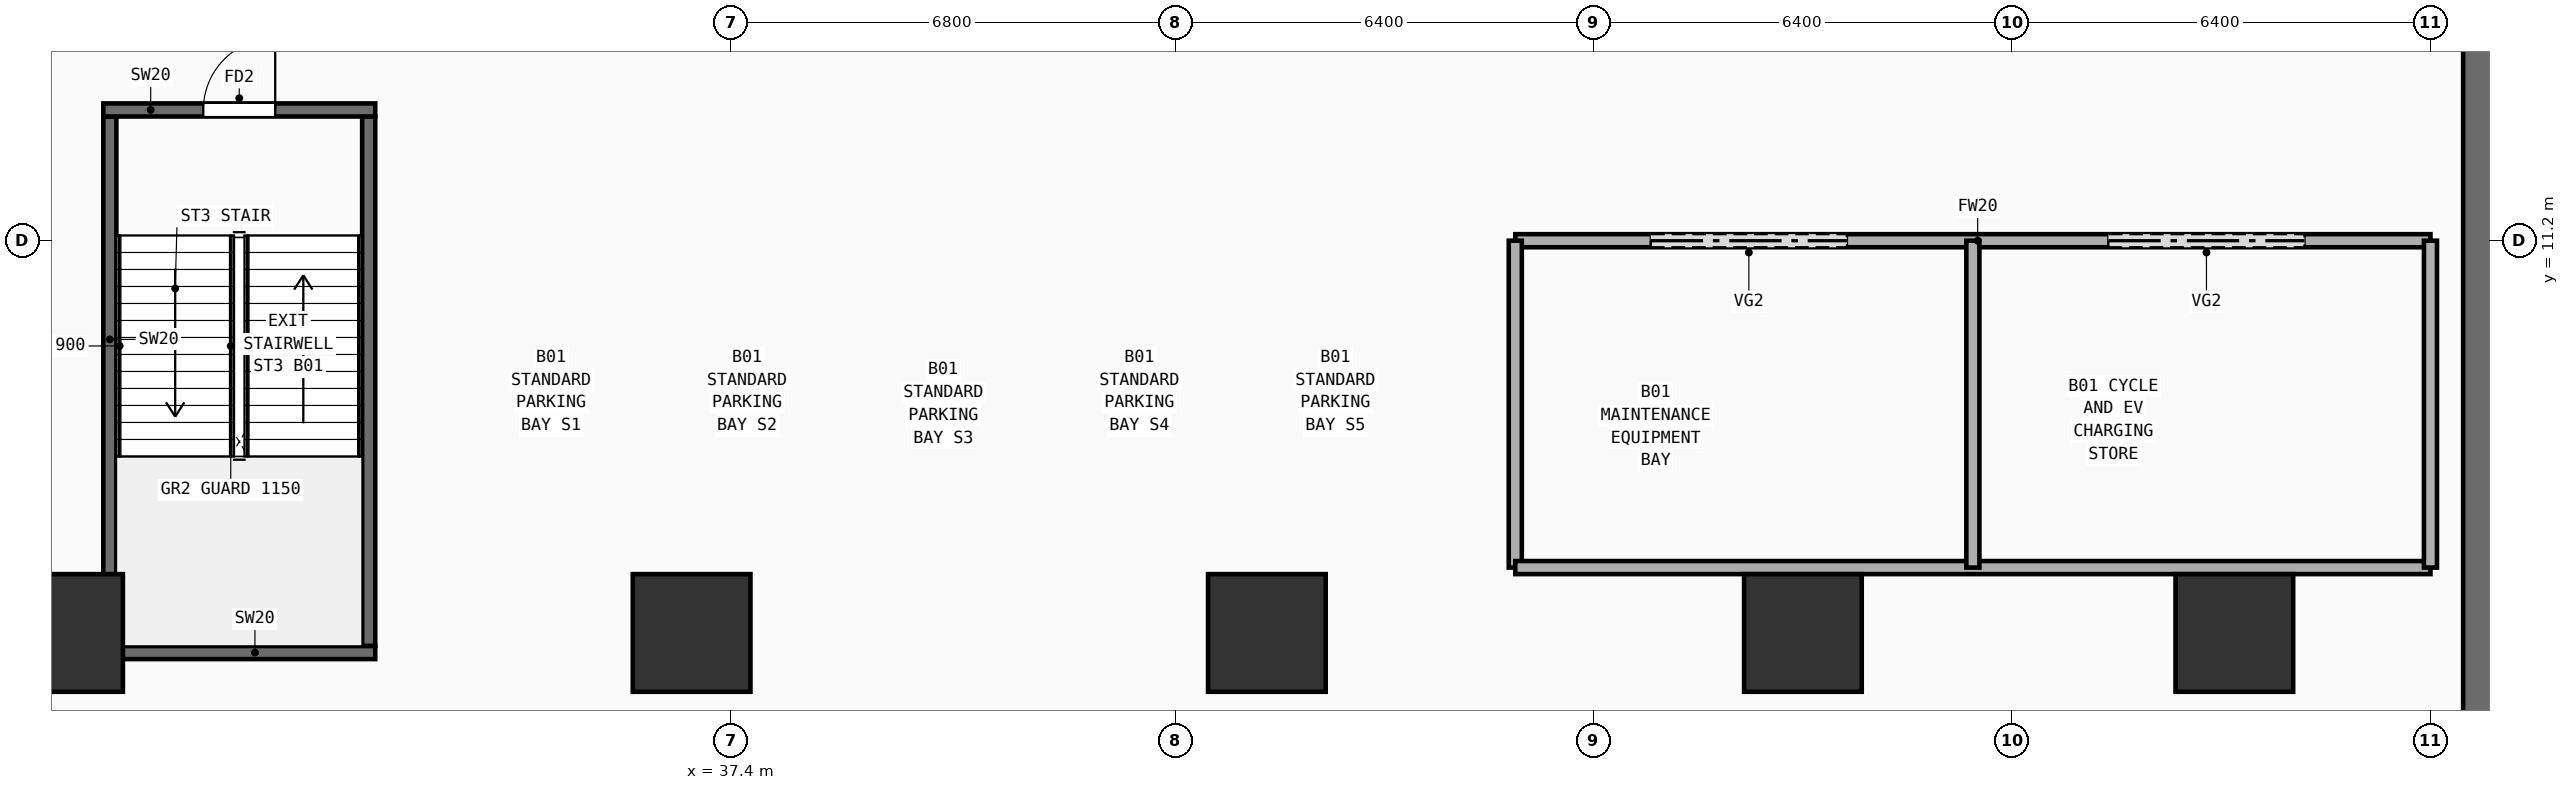
"""IFC4 building model, lengths in metres.
Left out: names, types, materials, properties, quantities, classifications, styles, units other than length and angle.
Written with IfcOpenShell. Run it as: python <this file> out.ifc"""

import sys

from ifc_helpers import new_model, si_unit, direction, frame, frame_2d, origin, origin_2d, place, context, subcontext, project, spatial, rectangle, extrude, element, fill, save


model = new_model("IFC4")
c1 = context("Model", 3, precision=1e-05, world=origin(), true_north=direction((0.0, 1.0)))
c2 = subcontext(c1, "Body", "Model", "MODEL_VIEW")
j1 = project(units=[si_unit("LENGTHUNIT", "METRE"), si_unit("PLANEANGLEUNIT", "RADIAN")], contexts=[c1])
p1 = place(None, origin())
s1 = spatial("IfcSite", under=j1, at=p1, CompositionType="ELEMENT")
p2 = place(p1, origin())
s2 = spatial("IfcBuilding", under=s1, at=p2, CompositionType="ELEMENT")
p3 = place(p2, frame((0.0, 0.0, -4.2)))
s3 = spatial("IfcBuildingStorey", under=s2, at=p3, CompositionType="ELEMENT", Elevation=-4.2)
p4 = place(p3, frame((64.4, 0.4, 0.0), z_axis=(0.0, 0.0, 1.0), x_axis=(0.0, 1.0, 0.0)))
e1 = element("IfcWall", 1, at=p4, inside=s3, PredefinedType="USERDEFINED", context=c2, shape_type="SweptSolid", body=[
    extrude(rectangle(XDim=50.4, YDim=1.0, at=frame_2d((25.2, 0.0))), origin(), (0.0, 0.0, 1.0), 3.82),
])
for number, where, z_axis, x_axis in (
    (2, (27.2, 5.2, 0.0), (0.0, 0.0, 1.0), (1.0, 0.0, 0.0)),
    (3, (36.8, 5.2, 0.0), (0.0, 0.0, 1.0), (1.0, 0.0, 0.0)),
    (4, (45.6, 5.2, 0.0), (0.0, 0.0, 1.0), (1.0, 0.0, 0.0)),
    (5, (53.8, 5.2, 0.0), (0.0, 0.0, 1.0), (1.0, 0.0, 0.0)),
    (6, (60.4, 5.2, 0.0), (0.0, 0.0, 1.0), (1.0, 0.0, 0.0)),
):
    element("IfcColumn", number, at=place(p3, frame(where, z_axis=z_axis, x_axis=x_axis)), inside=s3, PredefinedType="COLUMN", context=c2, shape_type="SweptSolid", body=[
        extrude(rectangle(XDim=1.8, YDim=1.8, at=origin_2d()), origin(), (0.0, 0.0, 1.0), 3.82),
    ])
for number, where, z_axis, x_axis in (
    (7, (27.9, 5.0, 0.0), (0.0, 0.0, 1.0), (0.0, 1.0, 0.0)),
    (8, (31.86, 5.0, 0.0), (0.0, 0.0, 1.0), (0.0, 1.0, 0.0)),
):
    element("IfcWall", number, at=place(p3, frame(where, z_axis=z_axis, x_axis=x_axis)), inside=s3, PredefinedType="SHEAR", context=c2, shape_type="SweptSolid", body=[
        extrude(rectangle(XDim=8.1, YDim=0.2, at=frame_2d((4.05, 0.0))), origin(), (0.0, 0.0, 1.0), 3.82),
    ])
p5 = place(p3, frame((27.8, 4.9, 0.0), z_axis=(0.0, 0.0, 1.0), x_axis=(1.0, 0.0, 0.0)))
e9 = element("IfcWall", 9, at=p5, inside=s3, PredefinedType="SHEAR", context=c2, shape_type="SweptSolid", body=[
    extrude(rectangle(XDim=4.16, YDim=0.2, at=frame_2d((2.08, 0.0))), origin(), (0.0, 0.0, 1.0), 3.82),
])
p6 = place(p3, frame((27.8, 13.2, 0.0), z_axis=(0.0, 0.0, 1.0), x_axis=(1.0, 0.0, 0.0)))
e10 = element("IfcWall", 10, at=p6, inside=s3, PredefinedType="SHEAR", context=c2, shape_type="SweptSolid", body=[
    extrude(rectangle(XDim=4.16, YDim=0.2, at=frame_2d((2.08, 0.0))), origin(), (0.0, 0.0, 1.0), 3.82),
])
p7 = place(p6, frame((1.53, 0.0, 0.0)))
e11 = element("IfcOpeningElement", 11, at=p7, cuts=e10, PredefinedType="OPENING", context=c2, shape_type="SweptSolid", body=[
    extrude(rectangle(XDim=1.1, YDim=2.2, at=frame_2d((0.55, 1.1))), frame((0.0, 0.11, 0.0), z_axis=(0.0, -1.0, 0.0), x_axis=(1.0, 0.0, 0.0)), (0.0, 0.0, 1.0), 0.22),
])
p8 = place(p3, frame((49.4, 11.2, 0.0), z_axis=(0.0, 0.0, 1.0), x_axis=(1.0, 0.0, 0.0)))
e12 = element("IfcWall", 12, at=p8, inside=s3, PredefinedType="PARTITIONING", context=c2, shape_type="SweptSolid", body=[
    extrude(rectangle(XDim=14.0, YDim=0.2, at=frame_2d((7.0, 0.0))), origin(), (0.0, 0.0, 1.0), 3.82),
])
p9 = place(p8, frame((2.073, 0.0, 0.0)))
e13 = element("IfcOpeningElement", 13, at=p9, cuts=e12, PredefinedType="OPENING", context=c2, shape_type="SweptSolid", body=[
    extrude(rectangle(XDim=3.0, YDim=2.8, at=frame_2d((1.5, 1.4))), frame((0.0, 0.11, 0.0), z_axis=(0.0, -1.0, 0.0), x_axis=(1.0, 0.0, 0.0)), (0.0, 0.0, 1.0), 0.22),
])
p10 = place(p8, frame((9.073, 0.0, 0.0)))
e14 = element("IfcOpeningElement", 14, at=p10, cuts=e12, PredefinedType="OPENING", context=c2, shape_type="SweptSolid", body=[
    extrude(rectangle(XDim=3.0, YDim=2.8, at=frame_2d((1.5, 1.4))), frame((0.0, 0.11, 0.0), z_axis=(0.0, -1.0, 0.0), x_axis=(1.0, 0.0, 0.0)), (0.0, 0.0, 1.0), 0.22),
])
p11 = place(p3, frame((49.4, 6.2, 0.0), z_axis=(0.0, 0.0, 1.0), x_axis=(0.0, 1.0, 0.0)))
e15 = element("IfcWall", 15, at=p11, inside=s3, PredefinedType="PARTITIONING", context=c2, shape_type="SweptSolid", body=[
    extrude(rectangle(XDim=5.0, YDim=0.2, at=frame_2d((2.5, 0.0))), origin(), (0.0, 0.0, 1.0), 3.82),
])
p12 = place(p3, frame((49.4, 6.2, 0.0), z_axis=(0.0, 0.0, 1.0), x_axis=(1.0, 0.0, 0.0)))
e16 = element("IfcWall", 16, at=p12, inside=s3, PredefinedType="PARTITIONING", context=c2, shape_type="SweptSolid", body=[
    extrude(rectangle(XDim=14.0, YDim=0.2, at=frame_2d((7.0, 0.0))), origin(), (0.0, 0.0, 1.0), 3.82),
])
for number, where, z_axis, x_axis in (
    (17, (63.4, 6.2, 0.0), (0.0, 0.0, 1.0), (0.0, 1.0, 0.0)),
    (18, (56.4, 6.2, 0.0), (0.0, 0.0, 1.0), (0.0, 1.0, 0.0)),
):
    element("IfcWall", number, at=place(p3, frame(where, z_axis=z_axis, x_axis=x_axis)), inside=s3, PredefinedType="PARTITIONING", context=c2, shape_type="SweptSolid", body=[
        extrude(rectangle(XDim=5.0, YDim=0.2, at=frame_2d((2.5, 0.0))), origin(), (0.0, 0.0, 1.0), 3.82),
    ])
p13 = place(p7, frame((1.1, 0.0, 0.0), z_axis=(0.0, 0.0, 1.0), x_axis=(-1.0, 0.0, 0.0)))
e19 = element("IfcDoor", 19, at=p13, inside=s3, OperationType="SINGLE_SWING_LEFT", PredefinedType="DOOR", context=c2, shape_type="SweptSolid", body=[
    extrude(rectangle(XDim=1.1, YDim=2.2, at=frame_2d((0.55, 1.1))), frame((0.0, 0.025, 0.0), z_axis=(0.0, -1.0, 0.0), x_axis=(1.0, 0.0, 0.0)), (0.0, 0.0, 1.0), 0.05),
])
fill(e11, e19)
p14 = place(p9, origin())
e20 = element("IfcDoor", 20, at=p14, inside=s3, OperationType="ROLLINGUP", PredefinedType="GATE", context=c2, shape_type="SweptSolid", body=[
    extrude(rectangle(XDim=3.0, YDim=2.8, at=frame_2d((1.5, 1.4))), frame((0.0, 0.025, 0.0), z_axis=(0.0, -1.0, 0.0), x_axis=(1.0, 0.0, 0.0)), (0.0, 0.0, 1.0), 0.05),
])
fill(e13, e20)
p15 = place(p10, origin())
e21 = element("IfcDoor", 21, at=p15, inside=s3, OperationType="ROLLINGUP", PredefinedType="GATE", context=c2, shape_type="SweptSolid", body=[
    extrude(rectangle(XDim=3.0, YDim=2.8, at=frame_2d((1.5, 1.4))), frame((0.0, 0.025, 0.0), z_axis=(0.0, -1.0, 0.0), x_axis=(1.0, 0.0, 0.0)), (0.0, 0.0, 1.0), 0.05),
])
fill(e14, e21)
save(model, sys.argv[1])
